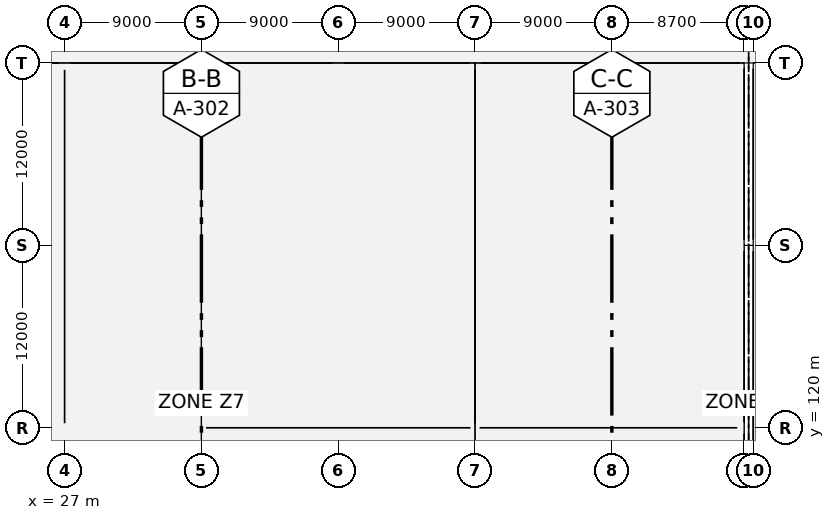
"""IFC4 building model, lengths in metres.
Left out: names, types, materials, properties, quantities, classifications, styles, units other than length and angle.
Written with IfcOpenShell. Run it as: python <this file> out.ifc"""

import sys

from ifc_helpers import new_model, si_unit, direction, frame, frame_2d, origin, origin_2d, place, context, subcontext, project, spatial, rectangle, extrude, element, fill, save


model = new_model("IFC4")
c1 = context("Model", 3, precision=1e-05, world=origin(), true_north=direction((0.0, 1.0)))
c2 = subcontext(c1, "Body", "Model", "MODEL_VIEW")
j1 = project(units=[si_unit("LENGTHUNIT", "METRE"), si_unit("PLANEANGLEUNIT", "RADIAN")], contexts=[c1])
p1 = place(None, origin())
s1 = spatial("IfcSite", under=j1, at=p1, CompositionType="ELEMENT")
p2 = place(p1, origin())
s2 = spatial("IfcBuilding", under=s1, at=p2, CompositionType="ELEMENT")
p3 = place(p2, origin())
s3 = spatial("IfcBuildingStorey", under=s2, at=p3, CompositionType="ELEMENT", Elevation=0.0)
for number, where, z_axis, x_axis in (
    (1, (27.0, 120.0, -0.5), (0.0, 0.0, 1.0), (1.0, 0.0, 0.0)),
    (2, (27.0, 132.0, -0.5), (0.0, 0.0, 1.0), (1.0, 0.0, 0.0)),
    (3, (27.0, 144.0, -0.5), (0.0, 0.0, 1.0), (1.0, 0.0, 0.0)),
    (4, (36.0, 120.0, -0.5), (0.0, 0.0, 1.0), (1.0, 0.0, 0.0)),
    (5, (36.0, 132.0, -0.5), (0.0, 0.0, 1.0), (1.0, 0.0, 0.0)),
    (6, (36.0, 144.0, -0.5), (0.0, 0.0, 1.0), (1.0, 0.0, 0.0)),
    (7, (45.0, 120.0, -0.5), (0.0, 0.0, 1.0), (1.0, 0.0, 0.0)),
    (8, (45.0, 132.0, -0.5), (0.0, 0.0, 1.0), (1.0, 0.0, 0.0)),
    (9, (45.0, 144.0, -0.5), (0.0, 0.0, 1.0), (1.0, 0.0, 0.0)),
    (10, (54.0, 120.0, -0.5), (0.0, 0.0, 1.0), (1.0, 0.0, 0.0)),
    (11, (54.0, 132.0, -0.5), (0.0, 0.0, 1.0), (1.0, 0.0, 0.0)),
    (12, (54.0, 144.0, -0.5), (0.0, 0.0, 1.0), (1.0, 0.0, 0.0)),
    (13, (63.0, 120.0, -0.5), (0.0, 0.0, 1.0), (1.0, 0.0, 0.0)),
    (14, (63.0, 132.0, -0.5), (0.0, 0.0, 1.0), (1.0, 0.0, 0.0)),
    (15, (63.0, 144.0, -0.5), (0.0, 0.0, 1.0), (1.0, 0.0, 0.0)),
):
    element("IfcColumn", number, at=place(p3, frame(where, z_axis=z_axis, x_axis=x_axis)), inside=s3, PredefinedType="COLUMN", context=c2, shape_type="SweptSolid", body=[
        extrude(rectangle(XDim=0.75, YDim=0.75, at=origin_2d()), origin(), (0.0, 0.0, 1.0), 6.8),
    ])
for number, where, z_axis, x_axis in (
    (16, (71.7, 120.0, -0.5), (0.0, 0.0, 1.0), (1.0, 0.0, 0.0)),
    (17, (71.7, 132.0, -0.5), (0.0, 0.0, 1.0), (1.0, 0.0, 0.0)),
    (18, (71.7, 144.0, -0.5), (0.0, 0.0, 1.0), (1.0, 0.0, 0.0)),
    (19, (72.3, 132.0, -0.5), (0.0, 0.0, 1.0), (1.0, 0.0, 0.0)),
    (20, (72.3, 144.0, -0.5), (0.0, 0.0, 1.0), (1.0, 0.0, 0.0)),
):
    element("IfcColumn", number, at=place(p3, frame(where, z_axis=z_axis, x_axis=x_axis)), inside=s3, PredefinedType="COLUMN", context=c2, shape_type="SweptSolid", body=[
        extrude(rectangle(XDim=0.55, YDim=0.75, at=origin_2d()), origin(), (0.0, 0.0, 1.0), 6.8),
    ])
for number, where, z_axis, x_axis in (
    (21, (18.375, 144.0, 0.0), (0.0, 0.0, 1.0), (1.0, 0.0, 0.0)),
    (22, (27.375, 144.0, 0.0), (0.0, 0.0, 1.0), (1.0, 0.0, 0.0)),
    (23, (36.375, 144.0, 0.0), (0.0, 0.0, 1.0), (1.0, 0.0, 0.0)),
    (24, (45.375, 144.0, 0.0), (0.0, 0.0, 1.0), (1.0, 0.0, 0.0)),
    (25, (54.375, 144.0, 0.0), (0.0, 0.0, 1.0), (1.0, 0.0, 0.0)),
):
    element("IfcWall", number, at=place(p3, frame(where, z_axis=z_axis, x_axis=x_axis)), inside=s3, PredefinedType="SOLIDWALL", context=c2, shape_type="SweptSolid", body=[
        extrude(rectangle(XDim=8.25, YDim=0.38, at=frame_2d((4.125, 0.0))), origin(), (0.0, 0.0, 1.0), 5.08),
    ])
p4 = place(p3, frame((63.375, 144.0, 0.0), z_axis=(0.0, 0.0, 1.0), x_axis=(1.0, 0.0, 0.0)))
e26 = element("IfcWall", 26, at=p4, inside=s3, PredefinedType="SOLIDWALL", context=c2, shape_type="SweptSolid", body=[
    extrude(rectangle(XDim=8.05, YDim=0.38, at=frame_2d((4.025, 0.0))), origin(), (0.0, 0.0, 1.0), 5.08),
])
p5 = place(p3, frame((71.7, 108.375, 0.0), z_axis=(0.0, 0.0, 1.0), x_axis=(0.0, 1.0, 0.0)))
e27 = element("IfcWall", 27, at=p5, inside=s3, PredefinedType="SOLIDWALL", context=c2, shape_type="SweptSolid", body=[
    extrude(rectangle(XDim=11.25, YDim=0.38, at=frame_2d((5.625, 0.0))), origin(), (0.0, 0.0, 1.0), 4.83),
])
p6 = place(p3, frame((71.7, 120.375, 0.0), z_axis=(0.0, 0.0, 1.0), x_axis=(0.0, 1.0, 0.0)))
e28 = element("IfcWall", 28, at=p6, inside=s3, PredefinedType="SOLIDWALL", context=c2, shape_type="SweptSolid", body=[
    extrude(rectangle(XDim=11.25, YDim=0.38, at=frame_2d((5.625, 0.0))), origin(), (0.0, 0.0, 1.0), 4.83),
])
p7 = place(p6, frame((4.825, 0.0, 3.34)))
e29 = element("IfcOpeningElement", 29, at=p7, cuts=e28, PredefinedType="OPENING", context=c2, shape_type="SweptSolid", body=[
    extrude(rectangle(XDim=1.6, YDim=1.45, at=frame_2d((0.8, 0.725))), frame((0.0, 0.2, 0.0), z_axis=(0.0, -1.0, 0.0), x_axis=(1.0, 0.0, 0.0)), (0.0, 0.0, 1.0), 0.4),
])
p8 = place(p3, frame((71.7, 132.375, 0.0), z_axis=(0.0, 0.0, 1.0), x_axis=(0.0, 1.0, 0.0)))
e30 = element("IfcWall", 30, at=p8, inside=s3, PredefinedType="SOLIDWALL", context=c2, shape_type="SweptSolid", body=[
    extrude(rectangle(XDim=11.25, YDim=0.38, at=frame_2d((5.625, 0.0))), origin(), (0.0, 0.0, 1.0), 4.83),
])
p9 = place(p8, frame((4.825, 0.0, 3.34)))
e31 = element("IfcOpeningElement", 31, at=p9, cuts=e30, PredefinedType="OPENING", context=c2, shape_type="SweptSolid", body=[
    extrude(rectangle(XDim=1.6, YDim=1.45, at=frame_2d((0.8, 0.725))), frame((0.0, 0.2, 0.0), z_axis=(0.0, -1.0, 0.0), x_axis=(1.0, 0.0, 0.0)), (0.0, 0.0, 1.0), 0.4),
])
p10 = place(p3, frame((72.3, 108.0, 0.0), z_axis=(0.0, 0.0, 1.0), x_axis=(0.0, 1.0, 0.0)))
e32 = element("IfcWall", 32, at=p10, inside=s3, PredefinedType="SOLIDWALL", context=c2, shape_type="SweptSolid", body=[
    extrude(rectangle(XDim=12.0, YDim=0.34, at=frame_2d((6.0, 0.0))), origin(), (0.0, 0.0, 1.0), 6.3),
])
p11 = place(p10, frame((2.8, 0.0, 0.9)))
e33 = element("IfcOpeningElement", 33, at=p11, cuts=e32, PredefinedType="OPENING", context=c2, shape_type="SweptSolid", body=[
    extrude(rectangle(XDim=2.4, YDim=3.5, at=frame_2d((1.2, 1.75))), frame((0.0, 0.18, 0.0), z_axis=(0.0, -1.0, 0.0), x_axis=(1.0, 0.0, 0.0)), (0.0, 0.0, 1.0), 0.36),
])
p12 = place(p10, frame((6.8, 0.0, 0.9)))
e34 = element("IfcOpeningElement", 34, at=p12, cuts=e32, PredefinedType="OPENING", context=c2, shape_type="SweptSolid", body=[
    extrude(rectangle(XDim=2.4, YDim=3.5, at=frame_2d((1.2, 1.75))), frame((0.0, 0.18, 0.0), z_axis=(0.0, -1.0, 0.0), x_axis=(1.0, 0.0, 0.0)), (0.0, 0.0, 1.0), 0.36),
])
p13 = place(p3, frame((72.3, 120.0, 0.0), z_axis=(0.0, 0.0, 1.0), x_axis=(0.0, 1.0, 0.0)))
e35 = element("IfcWall", 35, at=p13, inside=s3, PredefinedType="SOLIDWALL", context=c2, shape_type="SweptSolid", body=[
    extrude(rectangle(XDim=11.625, YDim=0.34, at=frame_2d((5.812, 0.0))), origin(), (0.0, 0.0, 1.0), 6.3),
])
p14 = place(p13, frame((2.675, 0.0, 0.9)))
e36 = element("IfcOpeningElement", 36, at=p14, cuts=e35, PredefinedType="OPENING", context=c2, shape_type="SweptSolid", body=[
    extrude(rectangle(XDim=2.4, YDim=3.5, at=frame_2d((1.2, 1.75))), frame((0.0, 0.18, 0.0), z_axis=(0.0, -1.0, 0.0), x_axis=(1.0, 0.0, 0.0)), (0.0, 0.0, 1.0), 0.36),
])
p15 = place(p13, frame((6.55, 0.0, 0.9)))
e37 = element("IfcOpeningElement", 37, at=p15, cuts=e35, PredefinedType="OPENING", context=c2, shape_type="SweptSolid", body=[
    extrude(rectangle(XDim=2.4, YDim=3.5, at=frame_2d((1.2, 1.75))), frame((0.0, 0.18, 0.0), z_axis=(0.0, -1.0, 0.0), x_axis=(1.0, 0.0, 0.0)), (0.0, 0.0, 1.0), 0.36),
])
p16 = place(p3, frame((72.3, 132.375, 0.0), z_axis=(0.0, 0.0, 1.0), x_axis=(0.0, 1.0, 0.0)))
e38 = element("IfcWall", 38, at=p16, inside=s3, PredefinedType="SOLIDWALL", context=c2, shape_type="SweptSolid", body=[
    extrude(rectangle(XDim=11.25, YDim=0.34, at=frame_2d((5.625, 0.0))), origin(), (0.0, 0.0, 1.0), 4.97),
])
p17 = place(p16, frame((2.55, 0.0, 0.9)))
e39 = element("IfcOpeningElement", 39, at=p17, cuts=e38, PredefinedType="OPENING", context=c2, shape_type="SweptSolid", body=[
    extrude(rectangle(XDim=2.4, YDim=3.5, at=frame_2d((1.2, 1.75))), frame((0.0, 0.18, 0.0), z_axis=(0.0, -1.0, 0.0), x_axis=(1.0, 0.0, 0.0)), (0.0, 0.0, 1.0), 0.36),
])
p18 = place(p16, frame((6.3, 0.0, 0.9)))
e40 = element("IfcOpeningElement", 40, at=p18, cuts=e38, PredefinedType="OPENING", context=c2, shape_type="SweptSolid", body=[
    extrude(rectangle(XDim=2.4, YDim=3.5, at=frame_2d((1.2, 1.75))), frame((0.0, 0.18, 0.0), z_axis=(0.0, -1.0, 0.0), x_axis=(1.0, 0.0, 0.0)), (0.0, 0.0, 1.0), 0.36),
])
p19 = place(p3, frame((27.0, 120.3, 0.0), z_axis=(0.0, 0.0, 1.0), x_axis=(0.0, 1.0, 0.0)))
e41 = element("IfcWall", 41, at=p19, inside=s3, PredefinedType="STANDARD", context=c2, shape_type="SweptSolid", body=[
    extrude(rectangle(XDim=23.25, YDim=0.21, at=frame_2d((11.625, 0.0))), origin(), (0.0, 0.0, 1.0), 4.83),
])
p20 = place(p19, frame((4.92, 0.0, 0.0)))
e42 = element("IfcOpeningElement", 42, at=p20, cuts=e41, PredefinedType="OPENING", context=c2, shape_type="SweptSolid", body=[
    extrude(rectangle(XDim=1.86, YDim=2.45, at=frame_2d((0.93, 1.225))), frame((0.0, 0.115, 0.0), z_axis=(0.0, -1.0, 0.0), x_axis=(1.0, 0.0, 0.0)), (0.0, 0.0, 1.0), 0.23),
])
p21 = place(p3, frame((36.3, 120.0, 0.0), z_axis=(0.0, 0.0, 1.0), x_axis=(1.0, 0.0, 0.0)))
e43 = element("IfcWall", 43, at=p21, inside=s3, PredefinedType="STANDARD", context=c2, shape_type="SweptSolid", body=[
    extrude(rectangle(XDim=17.4, YDim=0.21, at=frame_2d((8.7, 0.0))), origin(), (0.0, 0.0, 1.0), 5.13),
])
p22 = place(p21, frame((3.35, 0.0, 0.0)))
e44 = element("IfcOpeningElement", 44, at=p22, cuts=e43, PredefinedType="OPENING", context=c2, shape_type="SweptSolid", body=[
    extrude(rectangle(XDim=2.0, YDim=2.5, at=frame_2d((1.0, 1.25))), frame((0.0, 0.115, 0.0), z_axis=(0.0, -1.0, 0.0), x_axis=(1.0, 0.0, 0.0)), (0.0, 0.0, 1.0), 0.23),
])
p23 = place(p3, frame((54.3, 120.0, 0.0), z_axis=(0.0, 0.0, 1.0), x_axis=(1.0, 0.0, 0.0)))
e45 = element("IfcWall", 45, at=p23, inside=s3, PredefinedType="STANDARD", context=c2, shape_type="SweptSolid", body=[
    extrude(rectangle(XDim=16.95, YDim=0.195, at=frame_2d((8.475, 0.0))), origin(), (0.0, 0.0, 1.0), 5.13),
])
p24 = place(p23, frame((3.5, 0.0, 0.0)))
e46 = element("IfcOpeningElement", 46, at=p24, cuts=e45, PredefinedType="OPENING", context=c2, shape_type="SweptSolid", body=[
    extrude(rectangle(XDim=1.7, YDim=2.4, at=frame_2d((0.85, 1.2))), frame((0.0, 0.107, 0.0), z_axis=(0.0, -1.0, 0.0), x_axis=(1.0, 0.0, 0.0)), (0.0, 0.0, 1.0), 0.215),
])
p25 = place(p3, frame((54.0, 120.3, 0.0), z_axis=(0.0, 0.0, 1.0), x_axis=(0.0, 1.0, 0.0)))
e47 = element("IfcWall", 47, at=p25, inside=s3, PredefinedType="STANDARD", context=c2, shape_type="SweptSolid", body=[
    extrude(rectangle(XDim=23.25, YDim=0.21, at=frame_2d((11.625, 0.0))), origin(), (0.0, 0.0, 1.0), 4.83),
])
p26 = place(p25, frame((4.92, 0.0, 0.0)))
e48 = element("IfcOpeningElement", 48, at=p26, cuts=e47, PredefinedType="OPENING", context=c2, shape_type="SweptSolid", body=[
    extrude(rectangle(XDim=1.86, YDim=2.45, at=frame_2d((0.93, 1.225))), frame((0.0, 0.115, 0.0), z_axis=(0.0, -1.0, 0.0), x_axis=(1.0, 0.0, 0.0)), (0.0, 0.0, 1.0), 0.23),
])
p27 = place(p7, origin())
e49 = element("IfcWindow", 49, at=p27, inside=s3, PartitioningType="DOUBLE_PANEL_HORIZONTAL", PredefinedType="WINDOW", context=c2, shape_type="SweptSolid", body=[
    extrude(rectangle(XDim=1.6, YDim=1.45, at=frame_2d((0.8, 0.725))), frame((0.0, 0.03, 0.0), z_axis=(0.0, -1.0, 0.0), x_axis=(1.0, 0.0, 0.0)), (0.0, 0.0, 1.0), 0.06),
])
fill(e29, e49)
p28 = place(p9, origin())
e50 = element("IfcWindow", 50, at=p28, inside=s3, PartitioningType="DOUBLE_PANEL_HORIZONTAL", PredefinedType="WINDOW", context=c2, shape_type="SweptSolid", body=[
    extrude(rectangle(XDim=1.6, YDim=1.45, at=frame_2d((0.8, 0.725))), frame((0.0, 0.03, 0.0), z_axis=(0.0, -1.0, 0.0), x_axis=(1.0, 0.0, 0.0)), (0.0, 0.0, 1.0), 0.06),
])
fill(e31, e50)
p29 = place(p14, origin())
e51 = element("IfcWindow", 51, at=p29, inside=s3, PartitioningType="TRIPLE_PANEL_VERTICAL", PredefinedType="WINDOW", context=c2, shape_type="SweptSolid", body=[
    extrude(rectangle(XDim=2.4, YDim=3.5, at=frame_2d((1.2, 1.75))), frame((0.0, 0.03, 0.0), z_axis=(0.0, -1.0, 0.0), x_axis=(1.0, 0.0, 0.0)), (0.0, 0.0, 1.0), 0.06),
])
fill(e36, e51)
p30 = place(p15, origin())
e52 = element("IfcWindow", 52, at=p30, inside=s3, PartitioningType="TRIPLE_PANEL_VERTICAL", PredefinedType="WINDOW", context=c2, shape_type="SweptSolid", body=[
    extrude(rectangle(XDim=2.4, YDim=3.5, at=frame_2d((1.2, 1.75))), frame((0.0, 0.03, 0.0), z_axis=(0.0, -1.0, 0.0), x_axis=(1.0, 0.0, 0.0)), (0.0, 0.0, 1.0), 0.06),
])
fill(e37, e52)
p31 = place(p17, origin())
e53 = element("IfcWindow", 53, at=p31, inside=s3, PartitioningType="TRIPLE_PANEL_VERTICAL", PredefinedType="WINDOW", context=c2, shape_type="SweptSolid", body=[
    extrude(rectangle(XDim=2.4, YDim=3.5, at=frame_2d((1.2, 1.75))), frame((0.0, 0.03, 0.0), z_axis=(0.0, -1.0, 0.0), x_axis=(1.0, 0.0, 0.0)), (0.0, 0.0, 1.0), 0.06),
])
fill(e39, e53)
p32 = place(p18, origin())
e54 = element("IfcWindow", 54, at=p32, inside=s3, PartitioningType="TRIPLE_PANEL_VERTICAL", PredefinedType="WINDOW", context=c2, shape_type="SweptSolid", body=[
    extrude(rectangle(XDim=2.4, YDim=3.5, at=frame_2d((1.2, 1.75))), frame((0.0, 0.03, 0.0), z_axis=(0.0, -1.0, 0.0), x_axis=(1.0, 0.0, 0.0)), (0.0, 0.0, 1.0), 0.06),
])
fill(e40, e54)
p33 = place(p20, origin())
e55 = element("IfcDoor", 55, at=p33, inside=s3, OperationType="SLIDING_TO_LEFT", PredefinedType="DOOR", context=c2, shape_type="SweptSolid", body=[
    extrude(rectangle(XDim=1.86, YDim=2.45, at=frame_2d((0.93, 1.225))), frame((0.0, 0.025, 0.0), z_axis=(0.0, -1.0, 0.0), x_axis=(1.0, 0.0, 0.0)), (0.0, 0.0, 1.0), 0.05),
])
fill(e42, e55)
p34 = place(p22, origin())
e56 = element("IfcDoor", 56, at=p34, inside=s3, OperationType="SLIDING_TO_LEFT", PredefinedType="DOOR", context=c2, shape_type="SweptSolid", body=[
    extrude(rectangle(XDim=2.0, YDim=2.5, at=frame_2d((1.0, 1.25))), frame((0.0, 0.025, 0.0), z_axis=(0.0, -1.0, 0.0), x_axis=(1.0, 0.0, 0.0)), (0.0, 0.0, 1.0), 0.05),
])
fill(e44, e56)
p35 = place(p24, origin())
e57 = element("IfcDoor", 57, at=p35, inside=s3, OperationType="SLIDING_TO_LEFT", PredefinedType="DOOR", context=c2, shape_type="SweptSolid", body=[
    extrude(rectangle(XDim=1.7, YDim=2.4, at=frame_2d((0.85, 1.2))), frame((0.0, 0.025, 0.0), z_axis=(0.0, -1.0, 0.0), x_axis=(1.0, 0.0, 0.0)), (0.0, 0.0, 1.0), 0.05),
])
fill(e46, e57)
p36 = place(p26, origin())
e58 = element("IfcDoor", 58, at=p36, inside=s3, OperationType="SLIDING_TO_LEFT", PredefinedType="DOOR", context=c2, shape_type="SweptSolid", body=[
    extrude(rectangle(XDim=1.86, YDim=2.45, at=frame_2d((0.93, 1.225))), frame((0.0, 0.025, 0.0), z_axis=(0.0, -1.0, 0.0), x_axis=(1.0, 0.0, 0.0)), (0.0, 0.0, 1.0), 0.05),
])
fill(e48, e58)
save(model, sys.argv[1])
